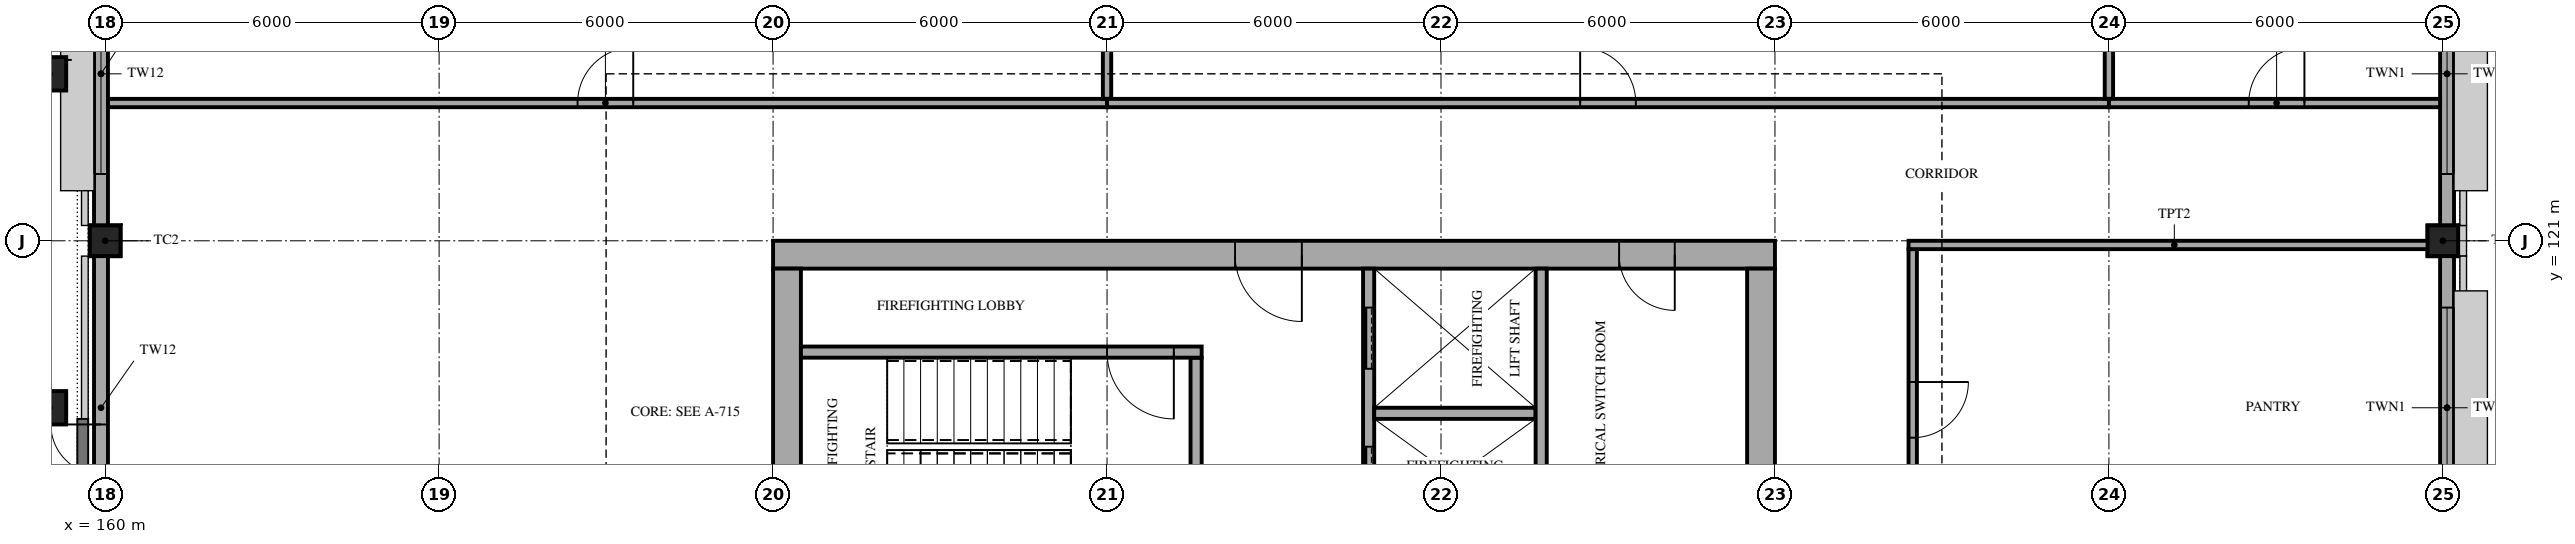
"""IFC4 building model, lengths in metres.
Left out: names, types, materials, properties, quantities, classifications, styles, units other than length and angle.
Written with IfcOpenShell. Run it as: python <this file> out.ifc"""

import sys

from ifc_helpers import new_model, si_unit, direction, frame, frame_2d, origin, origin_2d, place, context, subcontext, project, spatial, polyline, rectangle, hollow_rectangle, outline, extrude, element, fill, save


model = new_model("IFC4")
c1 = context("Model", 3, precision=1e-05, world=origin(), true_north=direction((0.0, 1.0)))
c2 = subcontext(c1, "Body", "Model", "MODEL_VIEW")
j1 = project(units=[si_unit("LENGTHUNIT", "METRE"), si_unit("PLANEANGLEUNIT", "RADIAN")], contexts=[c1])
p1 = place(None, origin())
s1 = spatial("IfcSite", under=j1, at=p1, CompositionType="ELEMENT")
p2 = place(p1, origin())
s2 = spatial("IfcBuilding", under=s1, at=p2, CompositionType="ELEMENT")
p3 = place(p2, frame((0.0, 0.0, 10.0)))
s3 = spatial("IfcBuildingStorey", under=s2, at=p3, CompositionType="ELEMENT", Elevation=10.0)
for number, where, z_axis, x_axis in (
    (1, (160.0, 121.0, 0.0), (0.0, 0.0, 1.0), (1.0, 0.0, 0.0)),
    (2, (202.0, 121.0, 0.0), (0.0, 0.0, 1.0), (1.0, 0.0, 0.0)),
):
    element("IfcColumn", number, at=place(p3, frame(where, z_axis=z_axis, x_axis=x_axis)), inside=s3, PredefinedType="COLUMN", context=c2, shape_type="SweptSolid", body=[
        extrude(hollow_rectangle(XDim=0.55, YDim=0.55, WallThickness=0.032, at=origin_2d()), origin(), (0.0, 0.0, 1.0), 5.0),
    ])
p4 = place(p3, frame((172.0, 120.75, 0.0), z_axis=(0.0, 0.0, 1.0), x_axis=(1.0, 0.0, 0.0)))
e3 = element("IfcWall", 3, at=p4, inside=s3, PredefinedType="SHEAR", context=c2, shape_type="SweptSolid", body=[
    extrude(rectangle(XDim=18.0, YDim=0.5, at=frame_2d((9.0, 0.0))), origin(), (0.0, 0.0, 1.0), 5.0),
])
p5 = place(p4, frame((8.3, 0.0, 0.0)))
e4 = element("IfcOpeningElement", 4, at=p5, cuts=e3, PredefinedType="OPENING", context=c2, shape_type="SweptSolid", body=[
    extrude(rectangle(XDim=1.2, YDim=2.1, at=frame_2d((0.6, 1.05))), frame((0.0, 0.26, 0.0), z_axis=(0.0, -1.0, 0.0), x_axis=(1.0, 0.0, 0.0)), (0.0, 0.0, 1.0), 0.52),
])
p6 = place(p4, frame((15.2, 0.0, 0.0)))
e5 = element("IfcOpeningElement", 5, at=p6, cuts=e3, PredefinedType="OPENING", context=c2, shape_type="SweptSolid", body=[
    extrude(rectangle(XDim=1.0, YDim=2.1, at=frame_2d((0.5, 1.05))), frame((0.0, 0.26, 0.0), z_axis=(0.0, -1.0, 0.0), x_axis=(1.0, 0.0, 0.0)), (0.0, 0.0, 1.0), 0.52),
])
p7 = place(p3, frame((172.25, 103.5, 0.0), z_axis=(0.0, 0.0, 1.0), x_axis=(0.0, 1.0, 0.0)))
e6 = element("IfcWall", 6, at=p7, inside=s3, PredefinedType="SHEAR", context=c2, shape_type="SweptSolid", body=[
    extrude(rectangle(XDim=17.0, YDim=0.5, at=frame_2d((8.5, 0.0))), origin(), (0.0, 0.0, 1.0), 5.0),
])
p8 = place(p7, frame((7.2, 0.0, 0.0)))
e7 = element("IfcOpeningElement", 7, at=p8, cuts=e6, PredefinedType="OPENING", context=c2, shape_type="SweptSolid", body=[
    extrude(rectangle(XDim=1.4, YDim=2.1, at=frame_2d((0.7, 1.05))), frame((0.0, 0.26, 0.0), z_axis=(0.0, -1.0, 0.0), x_axis=(1.0, 0.0, 0.0)), (0.0, 0.0, 1.0), 0.52),
])
p9 = place(p3, frame((189.75, 103.5, 0.0), z_axis=(0.0, 0.0, 1.0), x_axis=(0.0, 1.0, 0.0)))
e8 = element("IfcWall", 8, at=p9, inside=s3, PredefinedType="SHEAR", context=c2, shape_type="SweptSolid", body=[
    extrude(rectangle(XDim=17.0, YDim=0.5, at=frame_2d((8.5, 0.0))), origin(), (0.0, 0.0, 1.0), 5.0),
])
p10 = place(p9, frame((7.2, 0.0, 0.0)))
e9 = element("IfcOpeningElement", 9, at=p10, cuts=e8, PredefinedType="OPENING", context=c2, shape_type="SweptSolid", body=[
    extrude(rectangle(XDim=1.4, YDim=2.1, at=frame_2d((0.7, 1.05))), frame((0.0, 0.26, 0.0), z_axis=(0.0, -1.0, 0.0), x_axis=(1.0, 0.0, 0.0)), (0.0, 0.0, 1.0), 0.52),
])
for number, where, z_axis, x_axis in (
    (10, (159.0, 118.0, 0.0), (0.0, 0.0, 1.0), (1.0, 0.0, 0.0)),
    (11, (159.0, 124.0, 0.0), (0.0, 0.0, 1.0), (1.0, 0.0, 0.0)),
):
    element("IfcColumn", number, at=place(p3, frame(where, z_axis=z_axis, x_axis=x_axis)), inside=s3, PredefinedType="COLUMN", context=c2, shape_type="SweptSolid", body=[
        extrude(rectangle(XDim=0.6, YDim=0.6, at=origin_2d()), origin(), (0.0, 0.0, 1.0), 5.0),
    ])
p11 = place(p3, frame((159.925, 115.275, 0.0), z_axis=(0.0, 0.0, 1.0), x_axis=(0.0, 1.0, 0.0)))
e12 = element("IfcWall", 12, at=p11, inside=s3, PredefinedType="SOLIDWALL", context=c2, shape_type="SweptSolid", body=[
    extrude(rectangle(XDim=5.45, YDim=0.25, at=frame_2d((2.725, 0.0))), origin(), (0.0, 0.0, 1.0), 4.35),
])
p12 = place(p11, frame((0.625, 0.0, 0.0)))
e13 = element("IfcOpeningElement", 13, at=p12, cuts=e12, PredefinedType="OPENING", context=c2, shape_type="SweptSolid", body=[
    extrude(rectangle(XDim=1.8, YDim=2.1, at=frame_2d((0.9, 1.05))), frame((0.0, 0.135, 0.0), z_axis=(0.0, -1.0, 0.0), x_axis=(1.0, 0.0, 0.0)), (0.0, 0.0, 1.0), 0.27),
])
p13 = place(p3, frame((159.925, 121.275, 0.0), z_axis=(0.0, 0.0, 1.0), x_axis=(0.0, 1.0, 0.0)))
e14 = element("IfcWall", 14, at=p13, inside=s3, PredefinedType="SOLIDWALL", context=c2, shape_type="SweptSolid", body=[
    extrude(rectangle(XDim=5.45, YDim=0.25, at=frame_2d((2.725, 0.0))), origin(), (0.0, 0.0, 1.0), 4.35),
])
p14 = place(p13, frame((0.925, 0.0, 0.9)))
e15 = element("IfcOpeningElement", 15, at=p14, cuts=e14, PredefinedType="OPENING", context=c2, shape_type="SweptSolid", body=[
    extrude(rectangle(XDim=3.6, YDim=2.4, at=frame_2d((1.8, 1.2))), frame((0.0, 0.135, 0.0), z_axis=(0.0, -1.0, 0.0), x_axis=(1.0, 0.0, 0.0)), (0.0, 0.0, 1.0), 0.27),
])
p15 = place(p3, frame((202.075, 115.275, 0.0), z_axis=(0.0, 0.0, 1.0), x_axis=(0.0, 1.0, 0.0)))
e16 = element("IfcWall", 16, at=p15, inside=s3, PredefinedType="SOLIDWALL", context=c2, shape_type="SweptSolid", body=[
    extrude(rectangle(XDim=5.45, YDim=0.25, at=frame_2d((2.725, 0.0))), origin(), (0.0, 0.0, 1.0), 4.35),
])
p16 = place(p15, frame((0.925, 0.0, 0.9)))
e17 = element("IfcOpeningElement", 17, at=p16, cuts=e16, PredefinedType="OPENING", context=c2, shape_type="SweptSolid", body=[
    extrude(rectangle(XDim=3.6, YDim=2.4, at=frame_2d((1.8, 1.2))), frame((0.0, 0.135, 0.0), z_axis=(0.0, -1.0, 0.0), x_axis=(1.0, 0.0, 0.0)), (0.0, 0.0, 1.0), 0.27),
])
p17 = place(p3, frame((202.075, 121.275, 0.0), z_axis=(0.0, 0.0, 1.0), x_axis=(0.0, 1.0, 0.0)))
e18 = element("IfcWall", 18, at=p17, inside=s3, PredefinedType="SOLIDWALL", context=c2, shape_type="SweptSolid", body=[
    extrude(rectangle(XDim=5.45, YDim=0.25, at=frame_2d((2.725, 0.0))), origin(), (0.0, 0.0, 1.0), 4.35),
])
p18 = place(p17, frame((0.925, 0.0, 0.9)))
e19 = element("IfcOpeningElement", 19, at=p18, cuts=e18, PredefinedType="OPENING", context=c2, shape_type="SweptSolid", body=[
    extrude(rectangle(XDim=3.6, YDim=2.4, at=frame_2d((1.8, 1.2))), frame((0.0, 0.135, 0.0), z_axis=(0.0, -1.0, 0.0), x_axis=(1.0, 0.0, 0.0)), (0.0, 0.0, 1.0), 0.27),
])
p19 = place(p3, frame((179.6, 115.7, 0.0), z_axis=(0.0, 0.0, 1.0), x_axis=(0.0, 1.0, 0.0)))
e20 = element("IfcWall", 20, at=p19, inside=s3, PredefinedType="SOLIDWALL", context=c2, shape_type="SweptSolid", body=[
    extrude(rectangle(XDim=3.2, YDim=0.2, at=frame_2d((1.6, 0.0))), origin(), (0.0, 0.0, 1.0), 4.8),
])
p20 = place(p3, frame((172.5, 119.0, 0.0), z_axis=(0.0, 0.0, 1.0), x_axis=(1.0, 0.0, 0.0)))
e21 = element("IfcWall", 21, at=p20, inside=s3, PredefinedType="SOLIDWALL", context=c2, shape_type="SweptSolid", body=[
    extrude(rectangle(XDim=7.2, YDim=0.2, at=frame_2d((3.6, 0.0))), origin(), (0.0, 0.0, 1.0), 4.8),
])
p21 = place(p20, frame((5.5, 0.0, 0.0)))
e22 = element("IfcOpeningElement", 22, at=p21, cuts=e21, PredefinedType="OPENING", context=c2, shape_type="SweptSolid", body=[
    extrude(rectangle(XDim=1.2, YDim=2.1, at=frame_2d((0.6, 1.05))), frame((0.0, 0.11, 0.0), z_axis=(0.0, -1.0, 0.0), x_axis=(1.0, 0.0, 0.0)), (0.0, 0.0, 1.0), 0.22),
])
p22 = place(p3, frame((182.7, 115.7, 0.0), z_axis=(0.0, 0.0, 1.0), x_axis=(0.0, 1.0, 0.0)))
e23 = element("IfcWall", 23, at=p22, inside=s3, PredefinedType="SOLIDWALL", context=c2, shape_type="SweptSolid", body=[
    extrude(rectangle(XDim=4.8, YDim=0.2, at=frame_2d((2.4, 0.0))), origin(), (0.0, 0.0, 1.0), 4.8),
])
p23 = place(p22, frame((0.5, 0.0, 0.0)))
e24 = element("IfcOpeningElement", 24, at=p23, cuts=e23, PredefinedType="OPENING", context=c2, shape_type="SweptSolid", body=[
    extrude(rectangle(XDim=1.1, YDim=2.1, at=frame_2d((0.55, 1.05))), frame((0.0, 0.11, 0.0), z_axis=(0.0, -1.0, 0.0), x_axis=(1.0, 0.0, 0.0)), (0.0, 0.0, 1.0), 0.22),
])
p24 = place(p22, frame((3.0, 0.0, 0.0)))
e25 = element("IfcOpeningElement", 25, at=p24, cuts=e23, PredefinedType="OPENING", context=c2, shape_type="SweptSolid", body=[
    extrude(rectangle(XDim=1.1, YDim=2.1, at=frame_2d((0.55, 1.05))), frame((0.0, 0.11, 0.0), z_axis=(0.0, -1.0, 0.0), x_axis=(1.0, 0.0, 0.0)), (0.0, 0.0, 1.0), 0.22),
])
p25 = place(p3, frame((182.8, 117.9, 0.0), z_axis=(0.0, 0.0, 1.0), x_axis=(1.0, 0.0, 0.0)))
e26 = element("IfcWall", 26, at=p25, inside=s3, PredefinedType="SOLIDWALL", context=c2, shape_type="SweptSolid", body=[
    extrude(rectangle(XDim=2.9, YDim=0.2, at=frame_2d((1.45, 0.0))), origin(), (0.0, 0.0, 1.0), 4.8),
])
p26 = place(p3, frame((185.8, 115.7, 0.0), z_axis=(0.0, 0.0, 1.0), x_axis=(0.0, 1.0, 0.0)))
e27 = element("IfcWall", 27, at=p26, inside=s3, PredefinedType="SOLIDWALL", context=c2, shape_type="SweptSolid", body=[
    extrude(rectangle(XDim=4.8, YDim=0.2, at=frame_2d((2.4, 0.0))), origin(), (0.0, 0.0, 1.0), 4.8),
])
p27 = place(p3, frame((160.05, 123.475, 0.0), z_axis=(0.0, 0.0, 1.0), x_axis=(1.0, 0.0, 0.0)))
e28 = element("IfcWall", 28, at=p27, inside=s3, PredefinedType="PARTITIONING", context=c2, shape_type="SweptSolid", body=[
    extrude(rectangle(XDim=17.95, YDim=0.15, at=frame_2d((8.975, 0.0))), origin(), (0.0, 0.0, 1.0), 4.2),
])
p28 = place(p27, frame((8.438, 0.0, 0.0)))
e29 = element("IfcOpeningElement", 29, at=p28, cuts=e28, PredefinedType="OPENING", context=c2, shape_type="SweptSolid", body=[
    extrude(rectangle(XDim=1.0, YDim=2.1, at=frame_2d((0.5, 1.05))), frame((0.0, 0.085, 0.0), z_axis=(0.0, -1.0, 0.0), x_axis=(1.0, 0.0, 0.0)), (0.0, 0.0, 1.0), 0.17),
])
p29 = place(p3, frame((178.0, 123.55, 0.0), z_axis=(0.0, 0.0, 1.0), x_axis=(0.0, 1.0, 0.0)))
e30 = element("IfcWall", 30, at=p29, inside=s3, PredefinedType="PARTITIONING", context=c2, shape_type="SweptSolid", body=[
    extrude(rectangle(XDim=9.4, YDim=0.15, at=frame_2d((4.7, 0.0))), origin(), (0.0, 0.0, 1.0), 4.2),
])
p30 = place(p3, frame((178.0, 123.475, 0.0), z_axis=(0.0, 0.0, 1.0), x_axis=(1.0, 0.0, 0.0)))
e31 = element("IfcWall", 31, at=p30, inside=s3, PredefinedType="PARTITIONING", context=c2, shape_type="SweptSolid", body=[
    extrude(rectangle(XDim=18.0, YDim=0.15, at=frame_2d((9.0, 0.0))), origin(), (0.0, 0.0, 1.0), 4.2),
])
p31 = place(p30, frame((8.5, 0.0, 0.0)))
e32 = element("IfcOpeningElement", 32, at=p31, cuts=e31, PredefinedType="OPENING", context=c2, shape_type="SweptSolid", body=[
    extrude(rectangle(XDim=1.0, YDim=2.1, at=frame_2d((0.5, 1.05))), frame((0.0, 0.085, 0.0), z_axis=(0.0, -1.0, 0.0), x_axis=(1.0, 0.0, 0.0)), (0.0, 0.0, 1.0), 0.17),
])
p32 = place(p3, frame((196.0, 123.55, 0.0), z_axis=(0.0, 0.0, 1.0), x_axis=(0.0, 1.0, 0.0)))
e33 = element("IfcWall", 33, at=p32, inside=s3, PredefinedType="PARTITIONING", context=c2, shape_type="SweptSolid", body=[
    extrude(rectangle(XDim=9.4, YDim=0.15, at=frame_2d((4.7, 0.0))), origin(), (0.0, 0.0, 1.0), 4.2),
])
p33 = place(p3, frame((196.0, 123.475, 0.0), z_axis=(0.0, 0.0, 1.0), x_axis=(1.0, 0.0, 0.0)))
e34 = element("IfcWall", 34, at=p33, inside=s3, PredefinedType="PARTITIONING", context=c2, shape_type="SweptSolid", body=[
    extrude(rectangle(XDim=5.95, YDim=0.15, at=frame_2d((2.975, 0.0))), origin(), (0.0, 0.0, 1.0), 4.2),
])
p34 = place(p33, frame((2.512, 0.0, 0.0)))
e35 = element("IfcOpeningElement", 35, at=p34, cuts=e34, PredefinedType="OPENING", context=c2, shape_type="SweptSolid", body=[
    extrude(rectangle(XDim=1.0, YDim=2.1, at=frame_2d((0.5, 1.05))), frame((0.0, 0.085, 0.0), z_axis=(0.0, -1.0, 0.0), x_axis=(1.0, 0.0, 0.0)), (0.0, 0.0, 1.0), 0.17),
])
p35 = place(p3, frame((192.475, 115.0, 0.0), z_axis=(0.0, 0.0, 1.0), x_axis=(0.0, 1.0, 0.0)))
e36 = element("IfcWall", 36, at=p35, inside=s3, PredefinedType="PARTITIONING", context=c2, shape_type="SweptSolid", body=[
    extrude(rectangle(XDim=5.85, YDim=0.15, at=frame_2d((2.925, 0.0))), origin(), (0.0, 0.0, 1.0), 4.2),
])
p36 = place(p35, frame((2.462, 0.0, 0.0)))
e37 = element("IfcOpeningElement", 37, at=p36, cuts=e36, PredefinedType="OPENING", context=c2, shape_type="SweptSolid", body=[
    extrude(rectangle(XDim=1.0, YDim=2.1, at=frame_2d((0.5, 1.05))), frame((0.0, 0.085, 0.0), z_axis=(0.0, -1.0, 0.0), x_axis=(1.0, 0.0, 0.0)), (0.0, 0.0, 1.0), 0.17),
])
p37 = place(p3, frame((192.4, 120.925, 0.0), z_axis=(0.0, 0.0, 1.0), x_axis=(1.0, 0.0, 0.0)))
e38 = element("IfcWall", 38, at=p37, inside=s3, PredefinedType="PARTITIONING", context=c2, shape_type="SweptSolid", body=[
    extrude(rectangle(XDim=9.55, YDim=0.15, at=frame_2d((4.775, 0.0))), origin(), (0.0, 0.0, 1.0), 4.2),
])
p38 = place(p12, origin())
e39 = element("IfcDoor", 39, at=p38, inside=s3, OperationType="DOUBLE_DOOR_SINGLE_SWING", PredefinedType="DOOR", context=c2, shape_type="SweptSolid", body=[
    extrude(rectangle(XDim=1.8, YDim=2.1, at=frame_2d((0.9, 1.05))), frame((0.0, 0.025, 0.0), z_axis=(0.0, -1.0, 0.0), x_axis=(1.0, 0.0, 0.0)), (0.0, 0.0, 1.0), 0.05),
])
fill(e13, e39)
p39 = place(p14, origin())
e40 = element("IfcWindow", 40, at=p39, inside=s3, PartitioningType="TRIPLE_PANEL_VERTICAL", PredefinedType="WINDOW", context=c2, shape_type="SweptSolid", body=[
    extrude(outline(polyline([(0.0, 0.0), (3.6, 0.0), (3.6, 2.4), (0.0, 2.4), (0.0, 0.0)]), holes=[polyline([(0.06, 0.06), (0.96, 0.06), (0.96, 2.34), (0.06, 2.34), (0.06, 0.06)]), polyline([(1.06, 0.06), (2.54, 0.06), (2.54, 2.34), (1.06, 2.34), (1.06, 0.06)]), polyline([(2.64, 0.06), (3.54, 0.06), (3.54, 2.34), (2.64, 2.34), (2.64, 0.06)])]), frame((0.0, 0.03, 0.0), z_axis=(0.0, -1.0, 0.0), x_axis=(1.0, 0.0, 0.0)), (0.0, 0.0, 1.0), 0.06),
    extrude(rectangle(XDim=0.924, YDim=2.304, at=frame_2d((0.51, 1.2))), frame((0.0, 0.01, 0.0), z_axis=(0.0, -1.0, 0.0), x_axis=(1.0, 0.0, 0.0)), (0.0, 0.0, 1.0), 0.02),
    extrude(rectangle(XDim=1.504, YDim=2.304, at=frame_2d((1.8, 1.2))), frame((0.0, 0.01, 0.0), z_axis=(0.0, -1.0, 0.0), x_axis=(1.0, 0.0, 0.0)), (0.0, 0.0, 1.0), 0.02),
    extrude(rectangle(XDim=0.924, YDim=2.304, at=frame_2d((3.09, 1.2))), frame((0.0, 0.01, 0.0), z_axis=(0.0, -1.0, 0.0), x_axis=(1.0, 0.0, 0.0)), (0.0, 0.0, 1.0), 0.02),
])
fill(e15, e40)
p40 = place(p16, origin())
e41 = element("IfcWindow", 41, at=p40, inside=s3, PartitioningType="TRIPLE_PANEL_VERTICAL", PredefinedType="WINDOW", context=c2, shape_type="SweptSolid", body=[
    extrude(outline(polyline([(0.0, 0.0), (3.6, 0.0), (3.6, 2.4), (0.0, 2.4), (0.0, 0.0)]), holes=[polyline([(0.06, 0.06), (0.96, 0.06), (0.96, 2.34), (0.06, 2.34), (0.06, 0.06)]), polyline([(1.06, 0.06), (2.54, 0.06), (2.54, 2.34), (1.06, 2.34), (1.06, 0.06)]), polyline([(2.64, 0.06), (3.54, 0.06), (3.54, 2.34), (2.64, 2.34), (2.64, 0.06)])]), frame((0.0, 0.03, 0.0), z_axis=(0.0, -1.0, 0.0), x_axis=(1.0, 0.0, 0.0)), (0.0, 0.0, 1.0), 0.06),
    extrude(rectangle(XDim=0.924, YDim=2.304, at=frame_2d((0.51, 1.2))), frame((0.0, 0.01, 0.0), z_axis=(0.0, -1.0, 0.0), x_axis=(1.0, 0.0, 0.0)), (0.0, 0.0, 1.0), 0.02),
    extrude(rectangle(XDim=1.504, YDim=2.304, at=frame_2d((1.8, 1.2))), frame((0.0, 0.01, 0.0), z_axis=(0.0, -1.0, 0.0), x_axis=(1.0, 0.0, 0.0)), (0.0, 0.0, 1.0), 0.02),
    extrude(rectangle(XDim=0.924, YDim=2.304, at=frame_2d((3.09, 1.2))), frame((0.0, 0.01, 0.0), z_axis=(0.0, -1.0, 0.0), x_axis=(1.0, 0.0, 0.0)), (0.0, 0.0, 1.0), 0.02),
])
fill(e17, e41)
p41 = place(p18, origin())
e42 = element("IfcWindow", 42, at=p41, inside=s3, PartitioningType="TRIPLE_PANEL_VERTICAL", PredefinedType="WINDOW", context=c2, shape_type="SweptSolid", body=[
    extrude(outline(polyline([(0.0, 0.0), (3.6, 0.0), (3.6, 2.4), (0.0, 2.4), (0.0, 0.0)]), holes=[polyline([(0.06, 0.06), (0.96, 0.06), (0.96, 2.34), (0.06, 2.34), (0.06, 0.06)]), polyline([(1.06, 0.06), (2.54, 0.06), (2.54, 2.34), (1.06, 2.34), (1.06, 0.06)]), polyline([(2.64, 0.06), (3.54, 0.06), (3.54, 2.34), (2.64, 2.34), (2.64, 0.06)])]), frame((0.0, 0.03, 0.0), z_axis=(0.0, -1.0, 0.0), x_axis=(1.0, 0.0, 0.0)), (0.0, 0.0, 1.0), 0.06),
    extrude(rectangle(XDim=0.924, YDim=2.304, at=frame_2d((0.51, 1.2))), frame((0.0, 0.01, 0.0), z_axis=(0.0, -1.0, 0.0), x_axis=(1.0, 0.0, 0.0)), (0.0, 0.0, 1.0), 0.02),
    extrude(rectangle(XDim=1.504, YDim=2.304, at=frame_2d((1.8, 1.2))), frame((0.0, 0.01, 0.0), z_axis=(0.0, -1.0, 0.0), x_axis=(1.0, 0.0, 0.0)), (0.0, 0.0, 1.0), 0.02),
    extrude(rectangle(XDim=0.924, YDim=2.304, at=frame_2d((3.09, 1.2))), frame((0.0, 0.01, 0.0), z_axis=(0.0, -1.0, 0.0), x_axis=(1.0, 0.0, 0.0)), (0.0, 0.0, 1.0), 0.02),
])
fill(e19, e42)
p42 = place(p5, frame((1.2, 0.0, 0.0), z_axis=(0.0, 0.0, 1.0), x_axis=(-1.0, 0.0, 0.0)))
e43 = element("IfcDoor", 43, at=p42, inside=s3, OperationType="SINGLE_SWING_LEFT", PredefinedType="DOOR", context=c2, shape_type="SweptSolid", body=[
    extrude(rectangle(XDim=1.2, YDim=2.1, at=frame_2d((0.6, 1.05))), frame((0.0, 0.025, 0.0), z_axis=(0.0, -1.0, 0.0), x_axis=(1.0, 0.0, 0.0)), (0.0, 0.0, 1.0), 0.05),
])
fill(e4, e43)
p43 = place(p6, frame((1.0, 0.0, 0.0), z_axis=(0.0, 0.0, 1.0), x_axis=(-1.0, 0.0, 0.0)))
e44 = element("IfcDoor", 44, at=p43, inside=s3, OperationType="SINGLE_SWING_LEFT", PredefinedType="DOOR", context=c2, shape_type="SweptSolid", body=[
    extrude(rectangle(XDim=1.0, YDim=2.1, at=frame_2d((0.5, 1.05))), frame((0.0, 0.025, 0.0), z_axis=(0.0, -1.0, 0.0), x_axis=(1.0, 0.0, 0.0)), (0.0, 0.0, 1.0), 0.05),
])
fill(e5, e44)
p44 = place(p23, origin())
e45 = element("IfcDoor", 45, at=p44, inside=s3, OperationType="SLIDING_TO_LEFT", PredefinedType="DOOR", context=c2, shape_type="SweptSolid", body=[
    extrude(rectangle(XDim=1.1, YDim=2.1, at=frame_2d((0.55, 1.05))), frame((0.0, 0.025, 0.0), z_axis=(0.0, -1.0, 0.0), x_axis=(1.0, 0.0, 0.0)), (0.0, 0.0, 1.0), 0.05),
])
fill(e24, e45)
p45 = place(p24, origin())
e46 = element("IfcDoor", 46, at=p45, inside=s3, OperationType="SLIDING_TO_LEFT", PredefinedType="DOOR", context=c2, shape_type="SweptSolid", body=[
    extrude(rectangle(XDim=1.1, YDim=2.1, at=frame_2d((0.55, 1.05))), frame((0.0, 0.025, 0.0), z_axis=(0.0, -1.0, 0.0), x_axis=(1.0, 0.0, 0.0)), (0.0, 0.0, 1.0), 0.05),
])
fill(e25, e46)
p46 = place(p21, frame((1.2, 0.0, 0.0), z_axis=(0.0, 0.0, 1.0), x_axis=(-1.0, 0.0, 0.0)))
e47 = element("IfcDoor", 47, at=p46, inside=s3, OperationType="SINGLE_SWING_LEFT", PredefinedType="DOOR", context=c2, shape_type="SweptSolid", body=[
    extrude(rectangle(XDim=1.2, YDim=2.1, at=frame_2d((0.6, 1.05))), frame((0.0, 0.025, 0.0), z_axis=(0.0, -1.0, 0.0), x_axis=(1.0, 0.0, 0.0)), (0.0, 0.0, 1.0), 0.05),
])
fill(e22, e47)
p47 = place(p28, origin())
e48 = element("IfcDoor", 48, at=p47, inside=s3, OperationType="SINGLE_SWING_RIGHT", PredefinedType="DOOR", context=c2, shape_type="SweptSolid", body=[
    extrude(rectangle(XDim=1.0, YDim=2.1, at=frame_2d((0.5, 1.05))), frame((0.0, 0.025, 0.0), z_axis=(0.0, -1.0, 0.0), x_axis=(1.0, 0.0, 0.0)), (0.0, 0.0, 1.0), 0.05),
])
fill(e29, e48)
p48 = place(p31, origin())
e49 = element("IfcDoor", 49, at=p48, inside=s3, OperationType="SINGLE_SWING_LEFT", PredefinedType="DOOR", context=c2, shape_type="SweptSolid", body=[
    extrude(rectangle(XDim=1.0, YDim=2.1, at=frame_2d((0.5, 1.05))), frame((0.0, 0.025, 0.0), z_axis=(0.0, -1.0, 0.0), x_axis=(1.0, 0.0, 0.0)), (0.0, 0.0, 1.0), 0.05),
])
fill(e32, e49)
p49 = place(p34, origin())
e50 = element("IfcDoor", 50, at=p49, inside=s3, OperationType="SINGLE_SWING_RIGHT", PredefinedType="DOOR", context=c2, shape_type="SweptSolid", body=[
    extrude(rectangle(XDim=1.0, YDim=2.1, at=frame_2d((0.5, 1.05))), frame((0.0, 0.025, 0.0), z_axis=(0.0, -1.0, 0.0), x_axis=(1.0, 0.0, 0.0)), (0.0, 0.0, 1.0), 0.05),
])
fill(e35, e50)
p50 = place(p36, frame((1.0, 0.0, 0.0), z_axis=(0.0, 0.0, 1.0), x_axis=(-1.0, 0.0, 0.0)))
e51 = element("IfcDoor", 51, at=p50, inside=s3, OperationType="SINGLE_SWING_LEFT", PredefinedType="DOOR", context=c2, shape_type="SweptSolid", body=[
    extrude(rectangle(XDim=1.0, YDim=2.1, at=frame_2d((0.5, 1.05))), frame((0.0, 0.025, 0.0), z_axis=(0.0, -1.0, 0.0), x_axis=(1.0, 0.0, 0.0)), (0.0, 0.0, 1.0), 0.05),
])
fill(e37, e51)
save(model, sys.argv[1])
